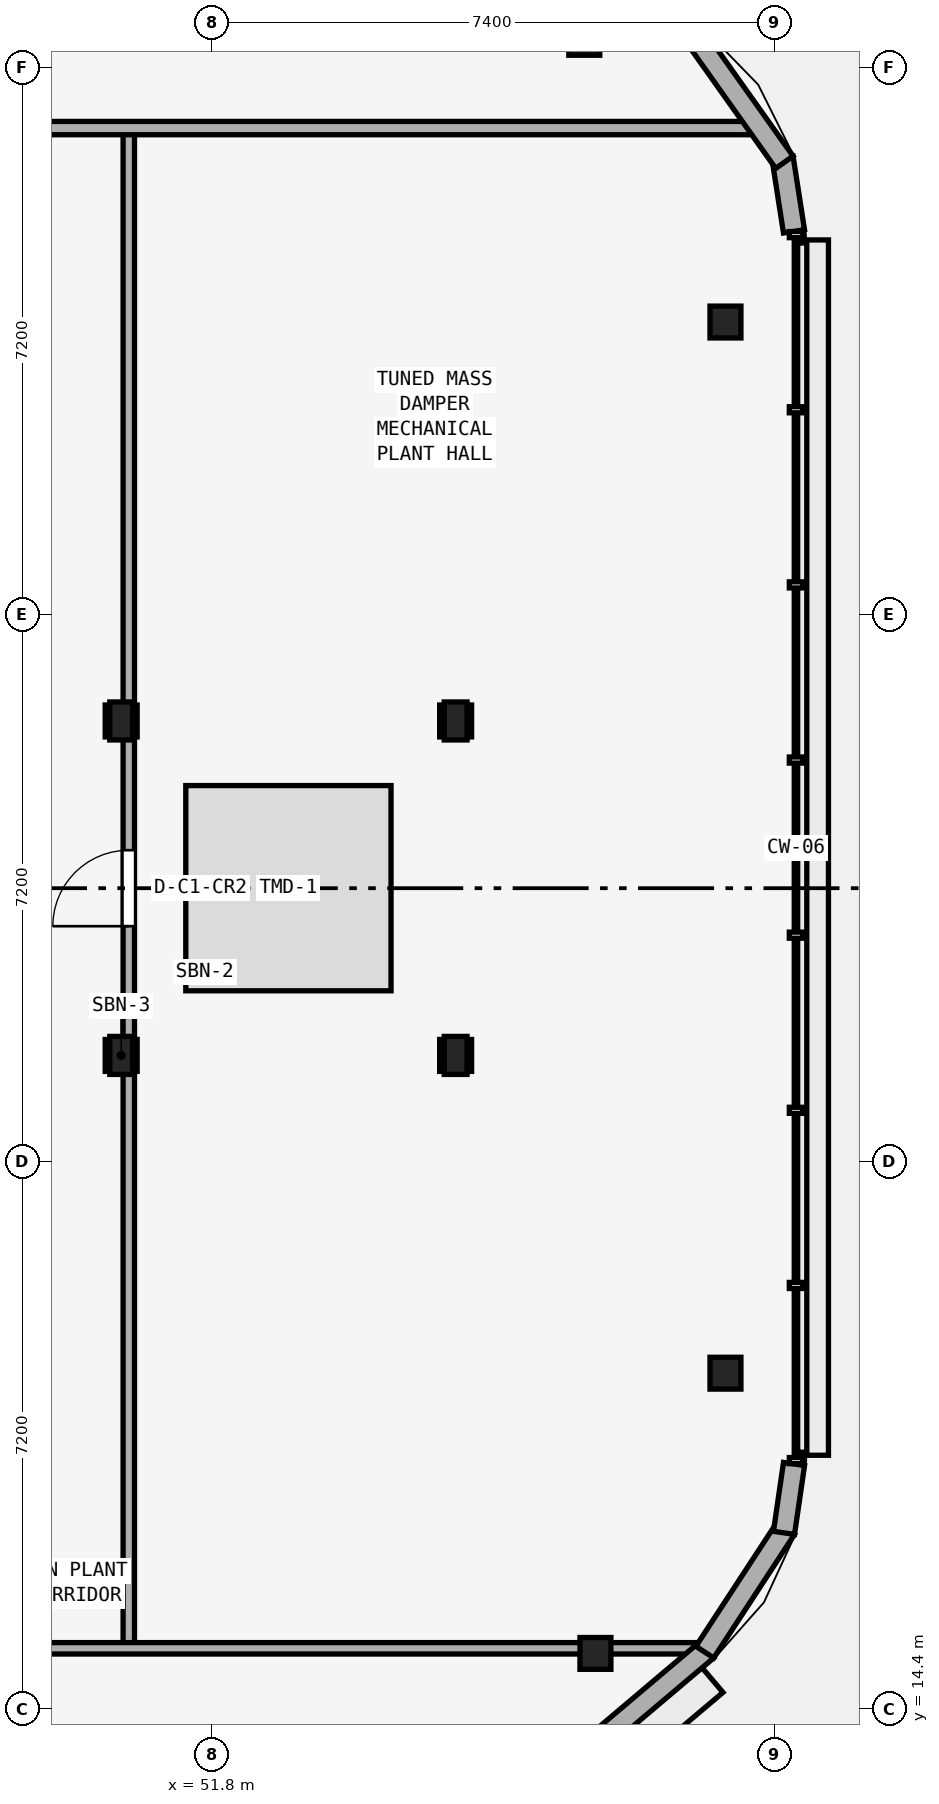
"""IFC4 building model, lengths in metres.
Left out: names, types, materials, properties, quantities, classifications, styles, units other than length and angle.
Written with IfcOpenShell. Run it as: python <this file> out.ifc"""

import sys

from ifc_helpers import new_model, si_unit, direction, frame, frame_2d, origin, origin_2d, place, context, subcontext, project, spatial, rectangle, i_section, extrude, element, fill, save


model = new_model("IFC4")
c1 = context("Model", 3, precision=1e-05, world=origin(), true_north=direction((0.0, 1.0)))
c2 = subcontext(c1, "Body", "Model", "MODEL_VIEW")
j1 = project(units=[si_unit("LENGTHUNIT", "METRE"), si_unit("PLANEANGLEUNIT", "RADIAN")], contexts=[c1])
p1 = place(None, origin())
s1 = spatial("IfcSite", under=j1, at=p1, CompositionType="ELEMENT")
p2 = place(p1, origin())
s2 = spatial("IfcBuilding", under=s1, at=p2, CompositionType="ELEMENT")
p3 = place(p2, frame((0.0, 0.0, 313.4)))
s3 = spatial("IfcBuildingStorey", under=s2, at=p3, CompositionType="ELEMENT", Elevation=313.4)
for number, where, z_axis, x_axis in (
    (1, (56.839, 15.133, 0.0), (0.0, 0.0, 1.0), (1.0, 0.0, 0.0)),
    (2, (58.55, 18.82, 0.0), (0.0, 0.0, 1.0), (1.0, 0.0, 0.0)),
    (3, (58.55, 32.648, 0.0), (0.0, 0.0, 1.0), (1.0, 0.0, 0.0)),
    (4, (56.693, 36.368, 0.0), (0.0, 0.0, 1.0), (1.0, 0.0, 0.0)),
):
    element("IfcColumn", number, at=place(p3, frame(where, z_axis=z_axis, x_axis=x_axis)), inside=s3, PredefinedType="COLUMN", context=c2, shape_type="SweptSolid", body=[
        extrude(i_section(OverallWidth=0.407, OverallDepth=0.419, WebThickness=0.031, FlangeThickness=0.049, at=origin_2d()), origin(), (0.0, 0.0, 1.0), 4.0),
    ])
for number, where, z_axis, x_axis in (
    (5, (50.6, 23.0, -0.28), (0.0, 0.0, 1.0), (1.0, 0.0, 0.0)),
    (6, (55.0, 23.0, -0.28), (0.0, 0.0, 1.0), (1.0, 0.0, 0.0)),
    (7, (55.0, 27.4, -0.28), (0.0, 0.0, 1.0), (1.0, 0.0, 0.0)),
    (8, (50.6, 27.4, -0.28), (0.0, 0.0, 1.0), (1.0, 0.0, 0.0)),
):
    element("IfcColumn", number, at=place(p3, frame(where, z_axis=z_axis, x_axis=x_axis)), inside=s3, PredefinedType="COLUMN", context=c2, shape_type="SweptSolid", body=[
        extrude(i_section(OverallWidth=0.3, OverallDepth=0.5, WebThickness=0.014, FlangeThickness=0.028, at=origin_2d()), origin(), (0.0, 0.0, 1.0), 4.28),
    ])
p4 = place(p3, frame((50.7, 15.2, 0.0), z_axis=(0.0, 0.0, 1.0), x_axis=(0.0, 1.0, 0.0)))
e9 = element("IfcWall", 9, at=p4, inside=s3, PredefinedType="PARTITIONING", context=c2, shape_type="SweptSolid", body=[
    extrude(rectangle(XDim=20.0, YDim=0.15, at=frame_2d((10.0, 0.0))), origin(), (0.0, 0.0, 1.0), 3.72),
])
p5 = place(p4, frame((9.5, 0.0, 0.0)))
e10 = element("IfcOpeningElement", 10, at=p5, cuts=e9, PredefinedType="OPENING", context=c2, shape_type="SweptSolid", body=[
    extrude(rectangle(XDim=1.0, YDim=2.12, at=frame_2d((0.5, 1.06))), frame((0.0, 0.085, 0.0), z_axis=(0.0, -1.0, 0.0), x_axis=(1.0, 0.0, 0.0)), (0.0, 0.0, 1.0), 0.17),
])
p6 = place(p3, frame((19.292, 15.2, 0.0), z_axis=(0.0, 0.0, 1.0), x_axis=(1.0, 0.0, 0.0)))
e11 = element("IfcWall", 11, at=p6, inside=s3, PredefinedType="PARTITIONING", context=c2, shape_type="SweptSolid", body=[
    extrude(rectangle(XDim=39.076, YDim=0.15, at=frame_2d((19.538, 0.0))), origin(), (0.0, 0.0, 1.0), 3.103),
])
p7 = place(p6, frame((19.708, 0.0, 0.0)))
e12 = element("IfcOpeningElement", 12, at=p7, cuts=e11, PredefinedType="OPENING", context=c2, shape_type="SweptSolid", body=[
    extrude(rectangle(XDim=1.0, YDim=2.12, at=frame_2d((0.5, 1.06))), frame((0.0, 0.085, 0.0), z_axis=(0.0, -1.0, 0.0), x_axis=(1.0, 0.0, 0.0)), (0.0, 0.0, 1.0), 0.17),
])
p8 = place(p3, frame((20.01, 35.2, 0.0), z_axis=(0.0, 0.0, 1.0), x_axis=(1.0, 0.0, 0.0)))
e13 = element("IfcWall", 13, at=p8, inside=s3, PredefinedType="PARTITIONING", context=c2, shape_type="SweptSolid", body=[
    extrude(rectangle(XDim=39.04, YDim=0.175, at=frame_2d((19.52, 0.0))), origin(), (0.0, 0.0, 1.0), 3.103),
])
p9 = place(p8, frame((18.99, 0.0, 0.0)))
e14 = element("IfcOpeningElement", 14, at=p9, cuts=e13, PredefinedType="OPENING", context=c2, shape_type="SweptSolid", body=[
    extrude(rectangle(XDim=1.0, YDim=2.12, at=frame_2d((0.5, 1.06))), frame((0.0, 0.097, 0.0), z_axis=(0.0, -1.0, 0.0), x_axis=(1.0, 0.0, 0.0)), (0.0, 0.0, 1.0), 0.195),
])
p10 = place(p3, frame((47.908, 6.388, 0.0), z_axis=(0.0, 0.0, 1.0), x_axis=(0.763574643448, 0.645719570621, 0.0)))
e15 = element("IfcWall", 15, at=p10, inside=s3, PredefinedType="STANDARD", context=c2, shape_type="SweptSolid", body=[
    extrude(rectangle(XDim=13.616, YDim=0.28, at=frame_2d((6.808, 0.0))), origin(), (0.0, 0.0, 1.0), 3.72),
])
p11 = place(p10, frame((1.803, 0.0, 0.9)))
e16 = element("IfcOpeningElement", 16, at=p11, cuts=e15, PredefinedType="OPENING", context=c2, shape_type="SweptSolid", body=[
    extrude(rectangle(XDim=1.6, YDim=1.45, at=frame_2d((0.8, 0.725))), frame((0.0, 0.15, 0.0), z_axis=(0.0, -1.0, 0.0), x_axis=(1.0, 0.0, 0.0)), (0.0, 0.0, 1.0), 0.3),
])
p12 = place(p10, frame((6.008, 0.0, 0.9)))
e17 = element("IfcOpeningElement", 17, at=p12, cuts=e15, PredefinedType="OPENING", context=c2, shape_type="SweptSolid", body=[
    extrude(rectangle(XDim=1.6, YDim=1.45, at=frame_2d((0.8, 0.725))), frame((0.0, 0.15, 0.0), z_axis=(0.0, -1.0, 0.0), x_axis=(1.0, 0.0, 0.0)), (0.0, 0.0, 1.0), 0.3),
])
p13 = place(p10, frame((10.213, 0.0, 0.9)))
e18 = element("IfcOpeningElement", 18, at=p13, cuts=e15, PredefinedType="OPENING", context=c2, shape_type="SweptSolid", body=[
    extrude(rectangle(XDim=1.6, YDim=1.45, at=frame_2d((0.8, 0.725))), frame((0.0, 0.15, 0.0), z_axis=(0.0, -1.0, 0.0), x_axis=(1.0, 0.0, 0.0)), (0.0, 0.0, 1.0), 0.3),
])
p14 = place(p3, frame((58.278, 15.15, 0.0), z_axis=(0.0, 0.0, 1.0), x_axis=(0.547367908429, 0.836892091504, 0.0)))
e19 = element("IfcWall", 19, at=p14, inside=s3, PredefinedType="STANDARD", context=c2, shape_type="SweptSolid", body=[
    extrude(rectangle(XDim=1.942, YDim=0.28, at=frame_2d((0.971, 0.0))), origin(), (0.0, 0.0, 1.0), 3.72),
])
p15 = place(p3, frame((59.32, 16.719, 0.0), z_axis=(0.0, 0.0, 1.0), x_axis=(0.144404722788, 0.989518709291, 0.0)))
e20 = element("IfcWall", 20, at=p15, inside=s3, PredefinedType="STANDARD", context=c2, shape_type="SweptSolid", body=[
    extrude(rectangle(XDim=0.916, YDim=0.28, at=frame_2d((0.458, 0.0))), origin(), (0.0, 0.0, 1.0), 3.72),
])
p16 = place(p3, frame((59.452, 33.841, 0.0), z_axis=(0.0, 0.0, 1.0), x_axis=(-0.153890702538, 0.988087876493, 0.0)))
e21 = element("IfcWall", 21, at=p16, inside=s3, PredefinedType="STANDARD", context=c2, shape_type="SweptSolid", body=[
    extrude(rectangle(XDim=0.98, YDim=0.28, at=frame_2d((0.49, 0.0))), origin(), (0.0, 0.0, 1.0), 3.72),
])
p17 = place(p3, frame((59.325, 34.75, 0.0), z_axis=(0.0, 0.0, 1.0), x_axis=(-0.578944699304, 0.815366810183, 0.0)))
e22 = element("IfcWall", 22, at=p17, inside=s3, PredefinedType="STANDARD", context=c2, shape_type="SweptSolid", body=[
    extrude(rectangle(XDim=2.066, YDim=0.28, at=frame_2d((1.033, 0.0))), origin(), (0.0, 0.0, 1.0), 3.72),
])
p18 = place(p5, origin())
e23 = element("IfcDoor", 23, at=p18, inside=s3, OperationType="SINGLE_SWING_LEFT", PredefinedType="DOOR", context=c2, shape_type="SweptSolid", body=[
    extrude(rectangle(XDim=1.0, YDim=2.12, at=frame_2d((0.5, 1.06))), frame((0.0, 0.025, 0.0), z_axis=(0.0, -1.0, 0.0), x_axis=(1.0, 0.0, 0.0)), (0.0, 0.0, 1.0), 0.05),
])
fill(e10, e23)
save(model, sys.argv[1])
